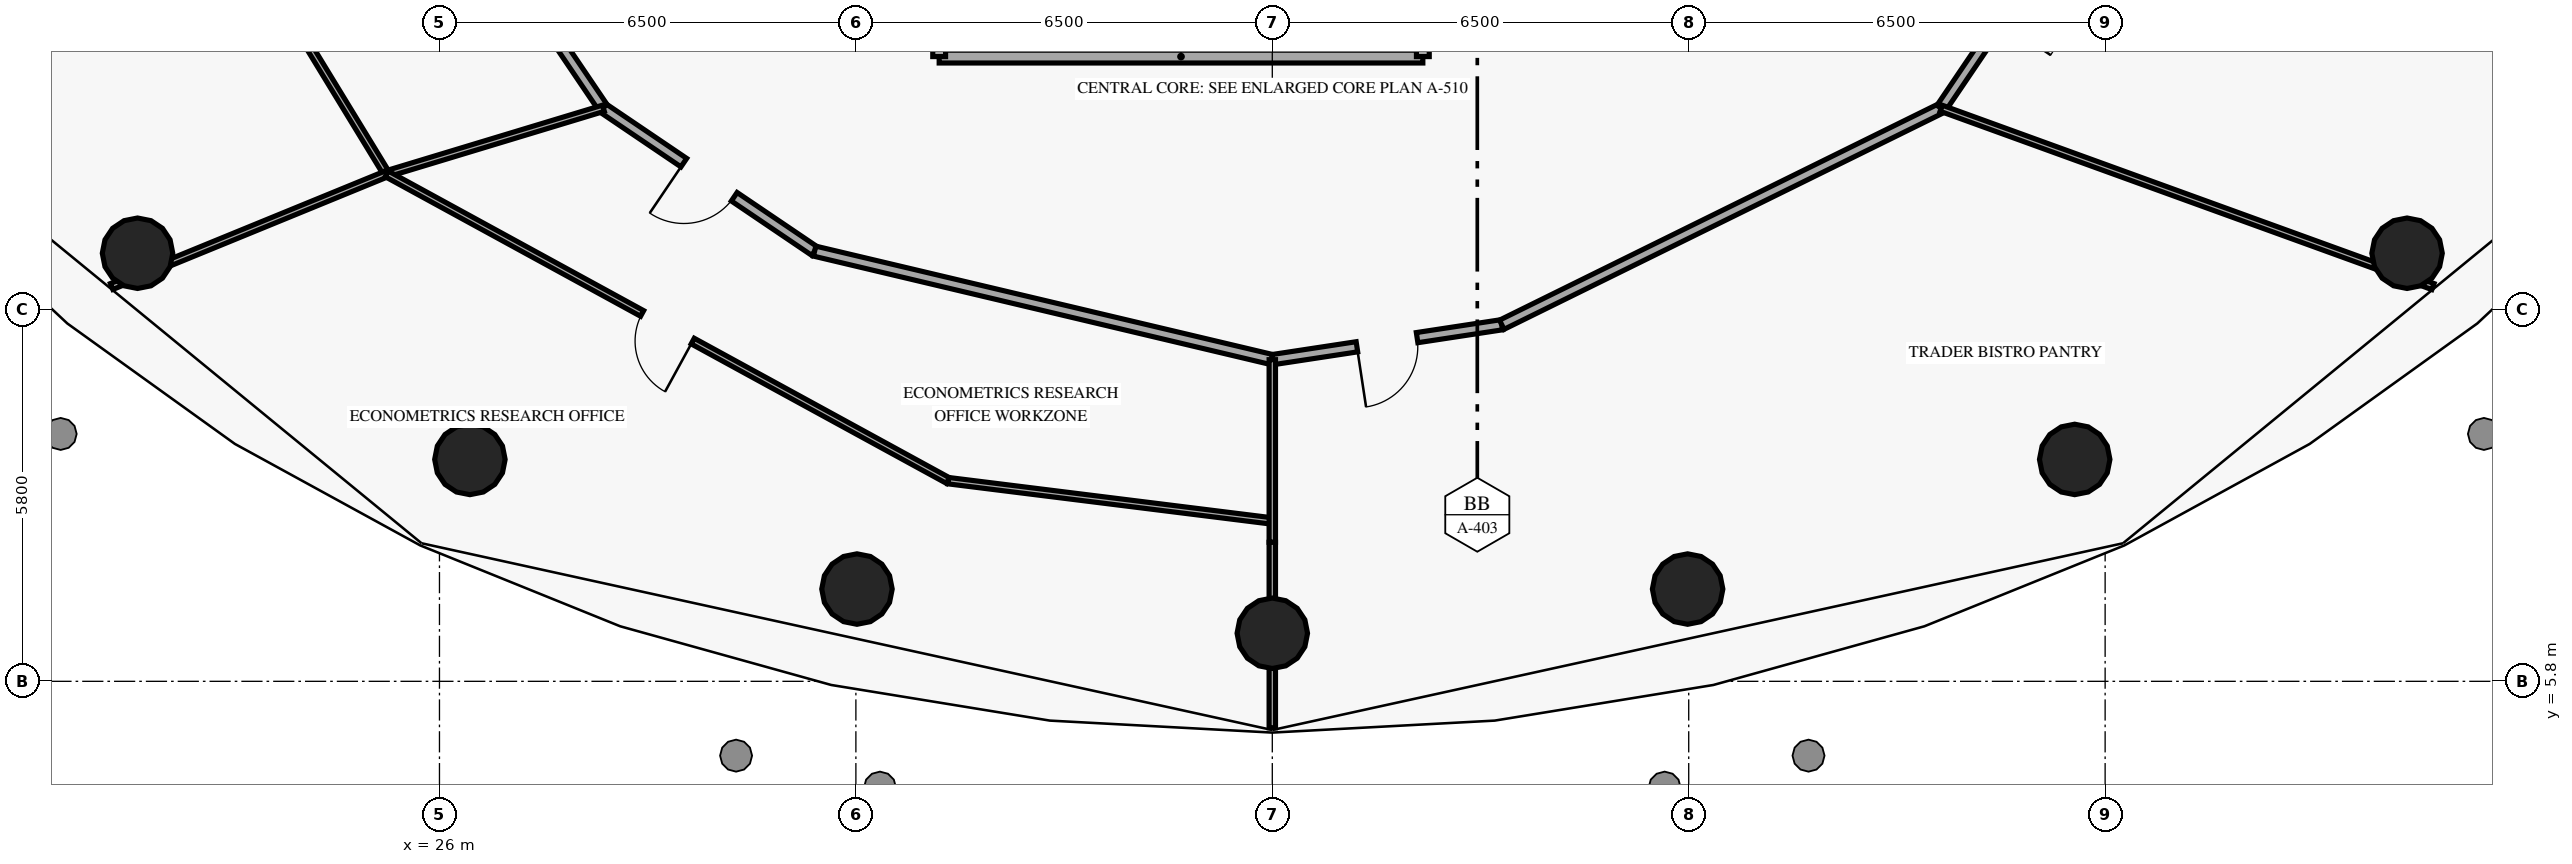
"""IFC4 building model, lengths in metres.
Left out: names, types, materials, properties, quantities, classifications, styles, units other than length and angle.
Written with IfcOpenShell. Run it as: python <this file> out.ifc"""

import sys

from ifc_helpers import new_model, si_unit, direction, frame, frame_2d, origin, origin_2d, place, context, subcontext, project, spatial, rectangle, circle, extrude, element, fill, save


model = new_model("IFC4")
c1 = context("Model", 3, precision=1e-05, world=origin(), true_north=direction((0.0, 1.0)))
c2 = subcontext(c1, "Body", "Model", "MODEL_VIEW")
j1 = project(units=[si_unit("LENGTHUNIT", "METRE"), si_unit("PLANEANGLEUNIT", "RADIAN")], contexts=[c1])
p1 = place(None, origin())
s1 = spatial("IfcSite", under=j1, at=p1, CompositionType="ELEMENT")
p2 = place(p1, origin())
s2 = spatial("IfcBuilding", under=s1, at=p2, CompositionType="ELEMENT")
p3 = place(p2, frame((0.0, 0.0, 65.55)))
s3 = spatial("IfcBuildingStorey", under=s2, at=p3, CompositionType="ELEMENT", Elevation=65.55)
for number, where, z_axis, x_axis in (
    (1, (21.287, 12.481, 0.0), (0.0, 0.0, 1.0), (1.0, 0.0, 0.0)),
    (2, (26.475, 9.263, 0.0), (0.0, 0.0, 1.0), (1.0, 0.0, 0.0)),
    (3, (32.517, 7.24, 0.0), (0.0, 0.0, 1.0), (1.0, 0.0, 0.0)),
    (4, (39.0, 6.55, 0.0), (0.0, 0.0, 1.0), (1.0, 0.0, 0.0)),
    (5, (45.483, 7.24, 0.0), (0.0, 0.0, 1.0), (1.0, 0.0, 0.0)),
    (6, (51.525, 9.263, 0.0), (0.0, 0.0, 1.0), (1.0, 0.0, 0.0)),
    (7, (56.713, 12.481, 0.0), (0.0, 0.0, 1.0), (1.0, 0.0, 0.0)),
):
    element("IfcColumn", number, at=place(p3, frame(where, z_axis=z_axis, x_axis=x_axis)), inside=s3, PredefinedType="COLUMN", context=c2, shape_type="SweptSolid", body=[
        extrude(circle(Radius=0.55, at=origin_2d()), origin(), (0.0, 0.0, 1.0), 3.8),
    ])
p4 = place(p3, frame((33.8, 15.55, 0.0), z_axis=(0.0, 0.0, 1.0), x_axis=(1.0, 0.0, 0.0)))
e8 = element("IfcWall", 8, at=p4, inside=s3, PredefinedType="SOLIDWALL", context=c2, shape_type="SweptSolid", body=[
    extrude(rectangle(XDim=7.55, YDim=0.2, at=frame_2d((3.775, 0.0))), origin(), (0.0, 0.0, 1.0), 3.8),
])
p5 = place(p3, frame((33.8, 15.55, 0.0), z_axis=(0.0, 0.0, 1.0), x_axis=(0.0, 1.0, 0.0)))
e9 = element("IfcWall", 9, at=p5, inside=s3, PredefinedType="SOLIDWALL", context=c2, shape_type="SweptSolid", body=[
    extrude(rectangle(XDim=2.8, YDim=0.2, at=frame_2d((1.4, 0.0))), origin(), (0.0, 0.0, 1.0), 3.8),
])
p6 = place(p3, frame((41.35, 15.55, 0.0), z_axis=(0.0, 0.0, 1.0), x_axis=(0.0, 1.0, 0.0)))
e10 = element("IfcWall", 10, at=p6, inside=s3, PredefinedType="SOLIDWALL", context=c2, shape_type="SweptSolid", body=[
    extrude(rectangle(XDim=2.8, YDim=0.2, at=frame_2d((1.4, 0.0))), origin(), (0.0, 0.0, 1.0), 3.8),
])
p7 = place(p6, frame((0.9, 0.0, 0.0)))
e11 = element("IfcOpeningElement", 11, at=p7, cuts=e10, PredefinedType="OPENING", context=c2, shape_type="SweptSolid", body=[
    extrude(rectangle(XDim=1.1, YDim=2.15, at=frame_2d((0.55, 1.075))), frame((0.0, 0.11, 0.0), z_axis=(0.0, -1.0, 0.0), x_axis=(1.0, 0.0, 0.0)), (0.0, 0.0, 1.0), 0.22),
])
p8 = place(p3, frame((26.182, 18.255, 0.0), z_axis=(0.0, 0.0, 1.0), x_axis=(0.560652063277, -0.828051486288, 0.0)))
e12 = element("IfcWall", 12, at=p8, inside=s3, PredefinedType="PARTITIONING", context=c2, shape_type="SweptSolid", body=[
    extrude(rectangle(XDim=4.24, YDim=0.16, at=frame_2d((2.12, 0.0))), origin(), (0.0, 0.0, 1.0), 3.8),
])
p9 = place(p3, frame((31.856, 12.514, 0.0), z_axis=(0.0, 0.0, 1.0), x_axis=(-0.828313553284, 0.560264810108, 0.0)))
e13 = element("IfcWall", 13, at=p9, inside=s3, PredefinedType="PARTITIONING", context=c2, shape_type="SweptSolid", body=[
    extrude(rectangle(XDim=3.98, YDim=0.16, at=frame_2d((1.99, 0.0))), origin(), (0.0, 0.0, 1.0), 3.8),
])
p10 = place(p9, frame((1.515, 0.0, 0.0)))
e14 = element("IfcOpeningElement", 14, at=p10, cuts=e13, PredefinedType="OPENING", context=c2, shape_type="SweptSolid", body=[
    extrude(rectangle(XDim=0.95, YDim=2.15, at=frame_2d((0.475, 1.075))), frame((0.0, 0.09, 0.0), z_axis=(0.0, -1.0, 0.0), x_axis=(1.0, 0.0, 0.0)), (0.0, 0.0, 1.0), 0.18),
])
p11 = place(p3, frame((31.856, 12.514, 0.0), z_axis=(0.0, 0.0, 1.0), x_axis=(0.973024133383, -0.230703350332, 0.0)))
e15 = element("IfcWall", 15, at=p11, inside=s3, PredefinedType="PARTITIONING", context=c2, shape_type="SweptSolid", body=[
    extrude(rectangle(XDim=7.342, YDim=0.16, at=frame_2d((3.671, 0.0))), origin(), (0.0, 0.0, 1.0), 3.8),
])
p12 = place(p3, frame((42.582, 11.365, 0.0), z_axis=(0.0, 0.0, 1.0), x_axis=(-0.988625807883, -0.150396183424, 0.0)))
e16 = element("IfcWall", 16, at=p12, inside=s3, PredefinedType="PARTITIONING", context=c2, shape_type="SweptSolid", body=[
    extrude(rectangle(XDim=3.623, YDim=0.16, at=frame_2d((1.812, 0.0))), origin(), (0.0, 0.0, 1.0), 3.8),
])
p13 = place(p12, frame((1.337, 0.0, 0.0)))
e17 = element("IfcOpeningElement", 17, at=p13, cuts=e16, PredefinedType="OPENING", context=c2, shape_type="SweptSolid", body=[
    extrude(rectangle(XDim=0.95, YDim=2.15, at=frame_2d((0.475, 1.075))), frame((0.0, 0.09, 0.0), z_axis=(0.0, -1.0, 0.0), x_axis=(1.0, 0.0, 0.0)), (0.0, 0.0, 1.0), 0.18),
])
p14 = place(p3, frame((42.582, 11.365, 0.0), z_axis=(0.0, 0.0, 1.0), x_axis=(0.897055406153, 0.441918090025, 0.0)))
e18 = element("IfcWall", 18, at=p14, inside=s3, PredefinedType="PARTITIONING", context=c2, shape_type="SweptSolid", body=[
    extrude(rectangle(XDim=7.646, YDim=0.16, at=frame_2d((3.823, 0.0))), origin(), (0.0, 0.0, 1.0), 3.8),
])
p15 = place(p3, frame((51.818, 18.255, 0.0), z_axis=(0.0, 0.0, 1.0), x_axis=(-0.560652063277, -0.828051486288, 0.0)))
e19 = element("IfcWall", 19, at=p15, inside=s3, PredefinedType="PARTITIONING", context=c2, shape_type="SweptSolid", body=[
    extrude(rectangle(XDim=4.24, YDim=0.16, at=frame_2d((2.12, 0.0))), origin(), (0.0, 0.0, 1.0), 3.8),
])
p16 = place(p15, frame((1.645, 0.0, 0.0)))
e20 = element("IfcOpeningElement", 20, at=p16, cuts=e19, PredefinedType="OPENING", context=c2, shape_type="SweptSolid", body=[
    extrude(rectangle(XDim=0.95, YDim=2.15, at=frame_2d((0.475, 1.075))), frame((0.0, 0.09, 0.0), z_axis=(0.0, -1.0, 0.0), x_axis=(1.0, 0.0, 0.0)), (0.0, 0.0, 1.0), 0.18),
])
p17 = place(p3, frame((20.116, 22.012, 0.0), z_axis=(0.0, 0.0, 1.0), x_axis=(0.520904998728, -0.853614656798, 0.0)))
e21 = element("IfcWall", 21, at=p17, inside=s3, PredefinedType="MOVABLE", context=c2, shape_type="SweptSolid", body=[
    extrude(rectangle(XDim=9.714, YDim=0.1, at=frame_2d((4.857, 0.0))), origin(), (0.0, 0.0, 1.0), 3.8),
])
p18 = place(p3, frame((28.559, 14.744, 0.0), z_axis=(0.0, 0.0, 1.0), x_axis=(-0.957121944774, -0.289685316907, 0.0)))
e22 = element("IfcWall", 22, at=p18, inside=s3, PredefinedType="MOVABLE", context=c2, shape_type="SweptSolid", body=[
    extrude(rectangle(XDim=3.535, YDim=0.1, at=frame_2d((1.767, 0.0))), origin(), (0.0, 0.0, 1.0), 3.8),
])
p19 = place(p3, frame((25.176, 13.72, 0.0), z_axis=(0.0, 0.0, 1.0), x_axis=(-0.925407732675, -0.378972991526, 0.0)))
e23 = element("IfcWall", 23, at=p19, inside=s3, PredefinedType="MOVABLE", context=c2, shape_type="SweptSolid", body=[
    extrude(rectangle(XDim=4.639, YDim=0.1, at=frame_2d((2.319, 0.0))), origin(), (0.0, 0.0, 1.0), 3.8),
])
p20 = place(p3, frame((33.94, 8.932, 0.0), z_axis=(0.0, 0.0, 1.0), x_axis=(-0.877568372218, 0.479451511712, 0.0)))
e24 = element("IfcWall", 24, at=p20, inside=s3, PredefinedType="MOVABLE", context=c2, shape_type="SweptSolid", body=[
    extrude(rectangle(XDim=9.987, YDim=0.1, at=frame_2d((4.993, 0.0))), origin(), (0.0, 0.0, 1.0), 3.8),
])
p21 = place(p20, frame((4.543, 0.0, 0.0)))
e25 = element("IfcOpeningElement", 25, at=p21, cuts=e24, PredefinedType="OPENING", context=c2, shape_type="SweptSolid", body=[
    extrude(rectangle(XDim=0.9, YDim=2.1, at=frame_2d((0.45, 1.05))), frame((0.0, 0.06, 0.0), z_axis=(0.0, -1.0, 0.0), x_axis=(1.0, 0.0, 0.0)), (0.0, 0.0, 1.0), 0.12),
])
p22 = place(p3, frame((33.94, 8.932, 0.0), z_axis=(0.0, 0.0, 1.0), x_axis=(0.992341094961, -0.123527937132, 0.0)))
e26 = element("IfcWall", 26, at=p22, inside=s3, PredefinedType="MOVABLE", context=c2, shape_type="SweptSolid", body=[
    extrude(rectangle(XDim=5.099, YDim=0.1, at=frame_2d((2.55, 0.0))), origin(), (0.0, 0.0, 1.0), 3.8),
])
p23 = place(p3, frame((39.0, 10.82, 0.0), z_axis=(0.0, 0.0, 1.0), x_axis=(0.0, -1.0, 0.0)))
e27 = element("IfcWall", 27, at=p23, inside=s3, PredefinedType="MOVABLE", context=c2, shape_type="SweptSolid", body=[
    extrude(rectangle(XDim=2.85, YDim=0.1, at=frame_2d((1.425, 0.0))), origin(), (0.0, 0.0, 1.0), 3.8),
])
p24 = place(p3, frame((39.0, 7.97, 0.0), z_axis=(0.0, 0.0, 1.0), x_axis=(0.0, -1.0, 0.0)))
e28 = element("IfcWall", 28, at=p24, inside=s3, PredefinedType="MOVABLE", context=c2, shape_type="SweptSolid", body=[
    extrude(rectangle(XDim=1.427, YDim=0.1, at=frame_2d((0.713, 0.0))), origin(), (0.0, 0.0, 1.0), 2.94),
])
p25 = place(p3, frame((39.0, 6.543, 0.0), z_axis=(0.0, 0.0, 1.0), x_axis=(0.0, -1.0, 0.0)))
e29 = element("IfcWall", 29, at=p25, inside=s3, PredefinedType="MOVABLE", context=c2, shape_type="SweptSolid", body=[
    extrude(rectangle(XDim=1.468, YDim=0.1, at=frame_2d((0.734, 0.0))), origin(), (0.0, 0.0, 1.0), 3.8),
])
p26 = place(p3, frame((49.441, 14.744, 0.0), z_axis=(0.0, 0.0, 1.0), x_axis=(0.940120376518, -0.340842599533, 0.0)))
e30 = element("IfcWall", 30, at=p26, inside=s3, PredefinedType="MOVABLE", context=c2, shape_type="SweptSolid", body=[
    extrude(rectangle(XDim=8.165, YDim=0.1, at=frame_2d((4.083, 0.0))), origin(), (0.0, 0.0, 1.0), 3.8),
])
p27 = place(p10, origin())
e31 = element("IfcDoor", 31, at=p27, inside=s3, OperationType="SINGLE_SWING_RIGHT", PredefinedType="DOOR", context=c2, shape_type="SweptSolid", body=[
    extrude(rectangle(XDim=0.95, YDim=2.15, at=frame_2d((0.475, 1.075))), frame((0.0, 0.025, 0.0), z_axis=(0.0, -1.0, 0.0), x_axis=(1.0, 0.0, 0.0)), (0.0, 0.0, 1.0), 0.05),
])
fill(e14, e31)
p28 = place(p13, origin())
e32 = element("IfcDoor", 32, at=p28, inside=s3, OperationType="SINGLE_SWING_RIGHT", PredefinedType="DOOR", context=c2, shape_type="SweptSolid", body=[
    extrude(rectangle(XDim=0.95, YDim=2.15, at=frame_2d((0.475, 1.075))), frame((0.0, 0.025, 0.0), z_axis=(0.0, -1.0, 0.0), x_axis=(1.0, 0.0, 0.0)), (0.0, 0.0, 1.0), 0.05),
])
fill(e17, e32)
p29 = place(p21, origin())
e33 = element("IfcDoor", 33, at=p29, inside=s3, OperationType="SINGLE_SWING_LEFT", PredefinedType="DOOR", context=c2, shape_type="SweptSolid", body=[
    extrude(rectangle(XDim=0.9, YDim=2.1, at=frame_2d((0.45, 1.05))), frame((0.0, 0.025, 0.0), z_axis=(0.0, -1.0, 0.0), x_axis=(1.0, 0.0, 0.0)), (0.0, 0.0, 1.0), 0.05),
])
fill(e25, e33)
save(model, sys.argv[1])
